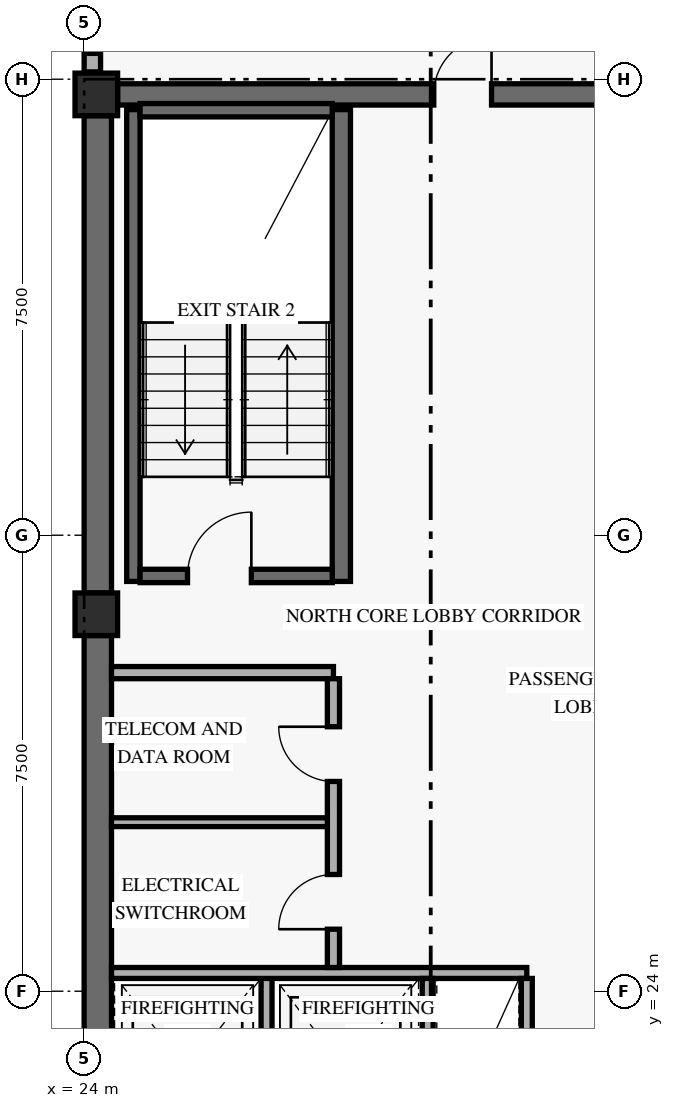
"""IFC4 building model, lengths in metres.
Left out: names, types, materials, properties, quantities, classifications, styles, units other than length and angle.
Written with IfcOpenShell. Run it as: python <this file> out.ifc"""

import sys

from ifc_helpers import new_model, si_unit, direction, frame, frame_2d, origin, origin_2d, place, context, subcontext, project, spatial, rectangle, extrude, element, fill, save


model = new_model("IFC4")
c1 = context("Model", 3, precision=1e-05, world=origin(), true_north=direction((0.0, 1.0)))
c2 = subcontext(c1, "Body", "Model", "MODEL_VIEW")
j1 = project(units=[si_unit("LENGTHUNIT", "METRE"), si_unit("PLANEANGLEUNIT", "RADIAN")], contexts=[c1])
p1 = place(None, origin())
s1 = spatial("IfcSite", under=j1, at=p1, CompositionType="ELEMENT")
p2 = place(p1, origin())
s2 = spatial("IfcBuilding", under=s1, at=p2, CompositionType="ELEMENT")
p3 = place(p2, frame((0.0, 0.0, 242.4)))
s3 = spatial("IfcBuildingStorey", under=s2, at=p3, CompositionType="ELEMENT", Elevation=242.4)
p4 = place(p3, frame((24.225, 17.9, 0.0), z_axis=(0.0, 0.0, 1.0), x_axis=(0.0, 1.0, 0.0)))
e1 = element("IfcWall", 1, at=p4, inside=s3, PredefinedType="SHEAR", context=c2, shape_type="SweptSolid", body=[
    extrude(rectangle(XDim=11.95, YDim=0.45, at=frame_2d((5.975, 0.0))), origin(), (0.0, 0.0, 1.0), 2.821),
])
p5 = place(p3, frame((24.225, 30.55, 0.0), z_axis=(0.0, 0.0, 1.0), x_axis=(0.0, 1.0, 0.0)))
e2 = element("IfcWall", 2, at=p5, inside=s3, PredefinedType="SHEAR", context=c2, shape_type="SweptSolid", body=[
    extrude(rectangle(XDim=7.85, YDim=0.45, at=frame_2d((3.925, 0.0))), origin(), (0.0, 0.0, 1.0), 2.821),
])
p6 = place(p3, frame((24.55, 38.75, 0.0), z_axis=(0.0, 0.0, 1.0), x_axis=(1.0, 0.0, 0.0)))
e3 = element("IfcWall", 3, at=p6, inside=s3, PredefinedType="SHEAR", context=c2, shape_type="SweptSolid", body=[
    extrude(rectangle(XDim=10.3, YDim=0.35, at=frame_2d((5.15, 0.0))), origin(), (0.0, 0.0, 1.0), 3.36),
])
p7 = place(p6, frame((5.2, 0.0, 0.0)))
e4 = element("IfcOpeningElement", 4, at=p7, cuts=e3, PredefinedType="OPENING", context=c2, shape_type="SweptSolid", body=[
    extrude(rectangle(XDim=0.95, YDim=2.15, at=frame_2d((0.475, 1.075))), frame((0.0, 0.185, 0.0), z_axis=(0.0, -1.0, 0.0), x_axis=(1.0, 0.0, 0.0)), (0.0, 0.0, 1.0), 0.37),
])
p8 = place(p3, frame((24.81, 30.74, 0.0), z_axis=(0.0, 0.0, 1.0), x_axis=(0.0, 1.0, 0.0)))
e5 = element("IfcWall", 5, at=p8, inside=s3, PredefinedType="SHEAR", context=c2, shape_type="SweptSolid", body=[
    extrude(rectangle(XDim=7.76, YDim=0.22, at=frame_2d((3.88, 0.0))), origin(), (0.0, 0.0, 1.0), 3.36),
])
p9 = place(p3, frame((28.23, 30.74, 0.0), z_axis=(0.0, 0.0, 1.0), x_axis=(0.0, 1.0, 0.0)))
e6 = element("IfcWall", 6, at=p9, inside=s3, PredefinedType="SHEAR", context=c2, shape_type="SweptSolid", body=[
    extrude(rectangle(XDim=7.76, YDim=0.3, at=frame_2d((3.88, 0.0))), origin(), (0.0, 0.0, 1.0), 3.36),
])
p10 = place(p3, frame((24.92, 30.83, 0.0), z_axis=(0.0, 0.0, 1.0), x_axis=(1.0, 0.0, 0.0)))
e7 = element("IfcWall", 7, at=p10, inside=s3, PredefinedType="SHEAR", context=c2, shape_type="SweptSolid", body=[
    extrude(rectangle(XDim=3.16, YDim=0.22, at=frame_2d((1.58, 0.0))), origin(), (0.0, 0.0, 1.0), 3.36),
])
p11 = place(p10, frame((0.78, 0.0, 0.0)))
e8 = element("IfcOpeningElement", 8, at=p11, cuts=e7, PredefinedType="OPENING", context=c2, shape_type="SweptSolid", body=[
    extrude(rectangle(XDim=1.05, YDim=2.15, at=frame_2d((0.525, 1.075))), frame((0.0, 0.12, 0.0), z_axis=(0.0, -1.0, 0.0), x_axis=(1.0, 0.0, 0.0)), (0.0, 0.0, 1.0), 0.24),
])
p12 = place(p3, frame((24.92, 38.49, 0.0), z_axis=(0.0, 0.0, 1.0), x_axis=(1.0, 0.0, 0.0)))
e9 = element("IfcWall", 9, at=p12, inside=s3, PredefinedType="SHEAR", context=c2, shape_type="SweptSolid", body=[
    extrude(rectangle(XDim=3.16, YDim=0.22, at=frame_2d((1.58, 0.0))), origin(), (0.0, 0.0, 1.0), 3.36),
])
for number, where, z_axis, x_axis in (
    (10, (24.2, 30.2, 0.0), (0.0, 0.0, 1.0), (1.0, 0.0, 0.0)),
    (11, (24.2, 38.75, 0.0), (0.0, 0.0, 1.0), (1.0, 0.0, 0.0)),
):
    element("IfcColumn", number, at=place(p3, frame(where, z_axis=z_axis, x_axis=x_axis)), inside=s3, PredefinedType="COLUMN", context=c2, shape_type="SweptSolid", body=[
        extrude(rectangle(XDim=0.7, YDim=0.7, at=origin_2d()), origin(), (0.0, 0.0, 1.0), 3.6),
    ])
p13 = place(p3, frame((24.135, 39.12, 0.0), z_axis=(0.0, 0.0, 1.0), x_axis=(0.0, 1.0, 0.0)))
e12 = element("IfcWall", 12, at=p13, inside=s3, PredefinedType="SOLIDWALL", context=c2, shape_type="SweptSolid", body=[
    extrude(rectangle(XDim=1.56, YDim=0.27, at=frame_2d((0.78, 0.0))), origin(), (0.0, 0.0, 1.0), 2.803),
])
p14 = place(p13, frame((0.305, 0.0, 0.85)))
e13 = element("IfcOpeningElement", 13, at=p14, cuts=e12, PredefinedType="OPENING", context=c2, shape_type="SweptSolid", body=[
    extrude(rectangle(XDim=0.95, YDim=1.5, at=frame_2d((0.475, 0.75))), frame((0.0, 0.145, 0.0), z_axis=(0.0, -1.0, 0.0), x_axis=(1.0, 0.0, 0.0)), (0.0, 0.0, 1.0), 0.29),
])
p15 = place(p3, frame((27.0, 21.19, 0.0), z_axis=(0.0, 0.0, 1.0), x_axis=(0.0, 1.0, 0.0)))
e14 = element("IfcWall", 14, at=p15, inside=s3, PredefinedType="STANDARD", context=c2, shape_type="SweptSolid", body=[
    extrude(rectangle(XDim=3.11, YDim=0.18, at=frame_2d((1.555, 0.0))), origin(), (0.0, 0.0, 1.0), 3.36),
])
p16 = place(p3, frame((24.45, 24.3, 0.0), z_axis=(0.0, 0.0, 1.0), x_axis=(1.0, 0.0, 0.0)))
e15 = element("IfcWall", 15, at=p16, inside=s3, PredefinedType="STANDARD", context=c2, shape_type="SweptSolid", body=[
    extrude(rectangle(XDim=6.83, YDim=0.18, at=frame_2d((3.415, 0.0))), origin(), (0.0, 0.0, 1.0), 3.36),
])
for number, where, z_axis, x_axis in (
    (16, (29.65, 21.19, 0.0), (0.0, 0.0, 1.0), (0.0, 1.0, 0.0)),
    (17, (31.28, 21.19, 0.0), (0.0, 0.0, 1.0), (0.0, 1.0, 0.0)),
):
    element("IfcWall", number, at=place(p3, frame(where, z_axis=z_axis, x_axis=x_axis)), inside=s3, PredefinedType="STANDARD", context=c2, shape_type="SweptSolid", body=[
        extrude(rectangle(XDim=3.02, YDim=0.18, at=frame_2d((1.51, 0.0))), origin(), (0.0, 0.0, 1.0), 3.36),
    ])
p17 = place(p3, frame((24.45, 29.24, 0.0), z_axis=(0.0, 0.0, 1.0), x_axis=(1.0, 0.0, 0.0)))
e18 = element("IfcWall", 18, at=p17, inside=s3, PredefinedType="STANDARD", context=c2, shape_type="SweptSolid", body=[
    extrude(rectangle(XDim=3.65, YDim=0.2, at=frame_2d((1.825, 0.0))), origin(), (0.0, 0.0, 1.0), 3.36),
])
p18 = place(p3, frame((28.1, 24.39, 0.0), z_axis=(0.0, 0.0, 1.0), x_axis=(0.0, 1.0, 0.0)))
e19 = element("IfcWall", 19, at=p18, inside=s3, PredefinedType="STANDARD", context=c2, shape_type="SweptSolid", body=[
    extrude(rectangle(XDim=4.75, YDim=0.2, at=frame_2d((2.375, 0.0))), origin(), (0.0, 0.0, 1.0), 3.36),
])
p19 = place(p18, frame((0.63, 0.0, 0.0)))
e20 = element("IfcOpeningElement", 20, at=p19, cuts=e19, PredefinedType="OPENING", context=c2, shape_type="SweptSolid", body=[
    extrude(rectangle(XDim=0.9, YDim=2.1, at=frame_2d((0.45, 1.05))), frame((0.0, 0.11, 0.0), z_axis=(0.0, -1.0, 0.0), x_axis=(1.0, 0.0, 0.0)), (0.0, 0.0, 1.0), 0.22),
])
p20 = place(p18, frame((3.06, 0.0, 0.0)))
e21 = element("IfcOpeningElement", 21, at=p20, cuts=e19, PredefinedType="OPENING", context=c2, shape_type="SweptSolid", body=[
    extrude(rectangle(XDim=0.9, YDim=2.1, at=frame_2d((0.45, 1.05))), frame((0.0, 0.11, 0.0), z_axis=(0.0, -1.0, 0.0), x_axis=(1.0, 0.0, 0.0)), (0.0, 0.0, 1.0), 0.22),
])
p21 = place(p3, frame((24.45, 26.78, 0.0), z_axis=(0.0, 0.0, 1.0), x_axis=(1.0, 0.0, 0.0)))
e22 = element("IfcWall", 22, at=p21, inside=s3, PredefinedType="PARTITIONING", context=c2, shape_type="SweptSolid", body=[
    extrude(rectangle(XDim=3.55, YDim=0.145, at=frame_2d((1.775, 0.0))), origin(), (0.0, 0.0, 1.0), 3.36),
])
p22 = place(p14, origin())
e23 = element("IfcWindow", 23, at=p22, inside=s3, PartitioningType="SINGLE_PANEL", PredefinedType="WINDOW", context=c2, shape_type="SweptSolid", body=[
    extrude(rectangle(XDim=0.95, YDim=1.5, at=frame_2d((0.475, 0.75))), frame((0.0, 0.03, 0.0), z_axis=(0.0, -1.0, 0.0), x_axis=(1.0, 0.0, 0.0)), (0.0, 0.0, 1.0), 0.06),
])
fill(e13, e23)
p23 = place(p11, origin())
e24 = element("IfcDoor", 24, at=p23, inside=s3, OperationType="SINGLE_SWING_RIGHT", PredefinedType="DOOR", context=c2, shape_type="SweptSolid", body=[
    extrude(rectangle(XDim=1.05, YDim=2.15, at=frame_2d((0.525, 1.075))), frame((0.0, 0.025, 0.0), z_axis=(0.0, -1.0, 0.0), x_axis=(1.0, 0.0, 0.0)), (0.0, 0.0, 1.0), 0.05),
])
fill(e8, e24)
p24 = place(p19, origin())
e25 = element("IfcDoor", 25, at=p24, inside=s3, OperationType="SINGLE_SWING_LEFT", PredefinedType="DOOR", context=c2, shape_type="SweptSolid", body=[
    extrude(rectangle(XDim=0.9, YDim=2.1, at=frame_2d((0.45, 1.05))), frame((0.0, 0.025, 0.0), z_axis=(0.0, -1.0, 0.0), x_axis=(1.0, 0.0, 0.0)), (0.0, 0.0, 1.0), 0.05),
])
fill(e20, e25)
p25 = place(p20, origin())
e26 = element("IfcDoor", 26, at=p25, inside=s3, OperationType="SINGLE_SWING_RIGHT", PredefinedType="DOOR", context=c2, shape_type="SweptSolid", body=[
    extrude(rectangle(XDim=0.9, YDim=2.1, at=frame_2d((0.45, 1.05))), frame((0.0, 0.025, 0.0), z_axis=(0.0, -1.0, 0.0), x_axis=(1.0, 0.0, 0.0)), (0.0, 0.0, 1.0), 0.05),
])
fill(e21, e26)
p26 = place(p7, origin())
e27 = element("IfcDoor", 27, at=p26, inside=s3, OperationType="SINGLE_SWING_RIGHT", PredefinedType="DOOR", context=c2, shape_type="SweptSolid", body=[
    extrude(rectangle(XDim=0.95, YDim=2.15, at=frame_2d((0.475, 1.075))), frame((0.0, 0.025, 0.0), z_axis=(0.0, -1.0, 0.0), x_axis=(1.0, 0.0, 0.0)), (0.0, 0.0, 1.0), 0.05),
])
fill(e4, e27)
save(model, sys.argv[1])
